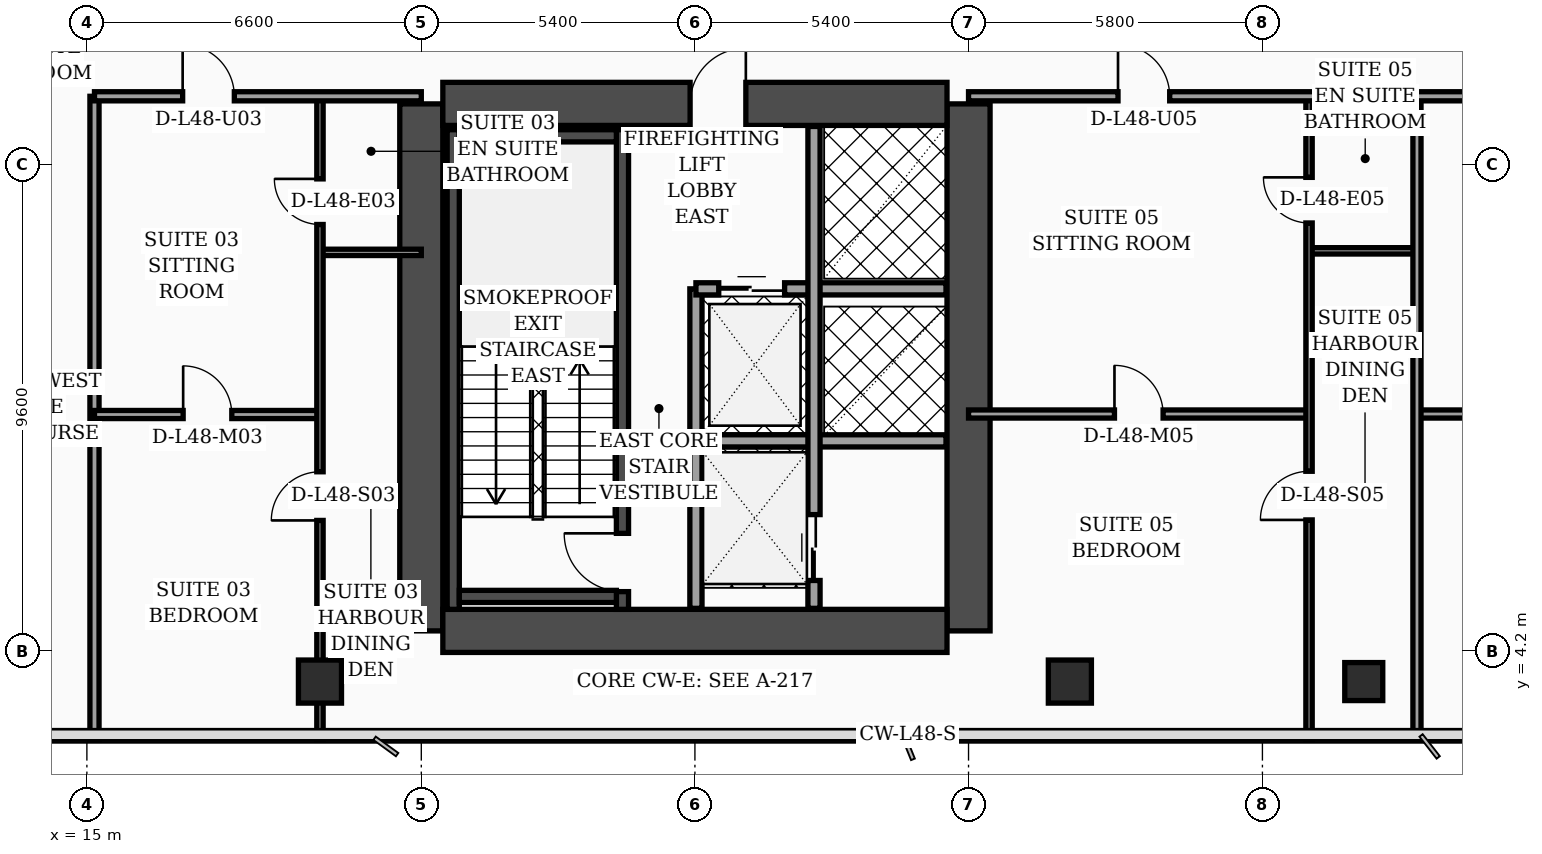
"""IFC4 building model, lengths in metres.
Left out: names, types, materials, properties, quantities, classifications, styles, units other than length and angle.
Written with IfcOpenShell. Run it as: python <this file> out.ifc"""

import sys

from ifc_helpers import new_model, si_unit, direction, frame, frame_2d, origin, origin_2d, place, context, subcontext, project, spatial, rectangle, hollow_rectangle, extrude, element, fill, save


model = new_model("IFC4")
c1 = context("Model", 3, precision=1e-05, world=origin(), true_north=direction((0.0, 1.0)))
c2 = subcontext(c1, "Body", "Model", "MODEL_VIEW")
j1 = project(units=[si_unit("LENGTHUNIT", "METRE"), si_unit("PLANEANGLEUNIT", "RADIAN")], contexts=[c1])
p1 = place(None, origin())
s1 = spatial("IfcSite", under=j1, at=p1, CompositionType="ELEMENT")
p2 = place(p1, origin())
s2 = spatial("IfcBuilding", under=s1, at=p2, CompositionType="ELEMENT")
p3 = place(p2, frame((0.0, 0.0, 195.1)))
s3 = spatial("IfcBuildingStorey", under=s2, at=p3, CompositionType="ELEMENT", Elevation=195.1)
for number, where, z_axis, x_axis in (
    (1, (21.6, 4.6, 0.0), (0.0, 0.0, 1.0), (0.0, 1.0, 0.0)),
    (2, (32.4, 4.6, 0.0), (0.0, 0.0, 1.0), (0.0, 1.0, 0.0)),
):
    element("IfcWall", number, at=place(p3, frame(where, z_axis=z_axis, x_axis=x_axis)), inside=s3, PredefinedType="SHEAR", context=c2, shape_type="SweptSolid", body=[
        extrude(rectangle(XDim=10.4, YDim=0.85, at=frame_2d((5.2, 0.0))), origin(), (0.0, 0.0, 1.0), 4.05),
    ])
p4 = place(p3, frame((22.025, 15.0, 0.0), z_axis=(0.0, 0.0, 1.0), x_axis=(1.0, 0.0, 0.0)))
e3 = element("IfcWall", 3, at=p4, inside=s3, PredefinedType="SHEAR", context=c2, shape_type="SweptSolid", body=[
    extrude(rectangle(XDim=9.95, YDim=0.85, at=frame_2d((4.975, 0.0))), origin(), (0.0, 0.0, 1.0), 4.05),
])
p5 = place(p4, frame((4.88, 0.0, 0.0)))
e4 = element("IfcOpeningElement", 4, at=p5, cuts=e3, PredefinedType="OPENING", context=c2, shape_type="SweptSolid", body=[
    extrude(rectangle(XDim=1.1, YDim=2.2, at=frame_2d((0.55, 1.1))), frame((0.0, 0.435, 0.0), z_axis=(0.0, -1.0, 0.0), x_axis=(1.0, 0.0, 0.0)), (0.0, 0.0, 1.0), 0.87),
])
p6 = place(p3, frame((22.025, 4.6, 0.0), z_axis=(0.0, 0.0, 1.0), x_axis=(1.0, 0.0, 0.0)))
e5 = element("IfcWall", 5, at=p6, inside=s3, PredefinedType="SHEAR", context=c2, shape_type="SweptSolid", body=[
    extrude(rectangle(XDim=9.95, YDim=0.85, at=frame_2d((4.975, 0.0))), origin(), (0.0, 0.0, 1.0), 4.05),
])
p7 = place(p3, frame((22.23, 5.025, 0.0), z_axis=(0.0, 0.0, 1.0), x_axis=(0.0, 1.0, 0.0)))
e6 = element("IfcWall", 6, at=p7, inside=s3, PredefinedType="SOLIDWALL", context=c2, shape_type="SweptSolid", body=[
    extrude(rectangle(XDim=9.465, YDim=0.24, at=frame_2d((4.732, 0.0))), origin(), (0.0, 0.0, 1.0), 4.05),
])
p8 = place(p3, frame((25.57, 5.025, 0.0), z_axis=(0.0, 0.0, 1.0), x_axis=(0.0, 1.0, 0.0)))
e7 = element("IfcWall", 7, at=p8, inside=s3, PredefinedType="SOLIDWALL", context=c2, shape_type="SweptSolid", body=[
    extrude(rectangle(XDim=9.465, YDim=0.24, at=frame_2d((4.732, 0.0))), origin(), (0.0, 0.0, 1.0), 4.05),
])
p9 = place(p8, frame((0.35, 0.0, 0.0)))
e8 = element("IfcOpeningElement", 8, at=p9, cuts=e7, PredefinedType="OPENING", context=c2, shape_type="SweptSolid", body=[
    extrude(rectangle(XDim=1.15, YDim=2.2, at=frame_2d((0.575, 1.1))), frame((0.0, 0.13, 0.0), z_axis=(0.0, -1.0, 0.0), x_axis=(1.0, 0.0, 0.0)), (0.0, 0.0, 1.0), 0.26),
])
for number, where, z_axis, x_axis in (
    (9, (22.35, 5.28, 0.0), (0.0, 0.0, 1.0), (1.0, 0.0, 0.0)),
    (10, (22.35, 14.37, 0.0), (0.0, 0.0, 1.0), (1.0, 0.0, 0.0)),
):
    element("IfcWall", number, at=place(p3, frame(where, z_axis=z_axis, x_axis=x_axis)), inside=s3, PredefinedType="SOLIDWALL", context=c2, shape_type="SweptSolid", body=[
        extrude(rectangle(XDim=3.1, YDim=0.24, at=frame_2d((1.55, 0.0))), origin(), (0.0, 0.0, 1.0), 4.05),
    ])
for number, where, z_axis, x_axis in (
    (11, (19.6, 3.6, 0.0), (0.0, 0.0, 1.0), (1.0, 0.0, 0.0)),
    (12, (34.4, 3.6, 0.0), (0.0, 0.0, 1.0), (1.0, 0.0, 0.0)),
):
    element("IfcColumn", number, at=place(p3, frame(where, z_axis=z_axis, x_axis=x_axis)), inside=s3, PredefinedType="COLUMN", context=c2, shape_type="SweptSolid", body=[
        extrude(hollow_rectangle(XDim=0.85, YDim=0.85, WallThickness=0.036, at=origin_2d()), origin(), (0.0, 0.0, 1.0), 4.05),
    ])
p10 = place(p3, frame((40.2, 3.6, 0.0), z_axis=(0.0, 0.0, 1.0), x_axis=(1.0, 0.0, 0.0)))
e13 = element("IfcColumn", 13, at=p10, inside=s3, PredefinedType="COLUMN", context=c2, shape_type="SweptSolid", body=[
    extrude(hollow_rectangle(XDim=0.75, YDim=0.75, WallThickness=0.032, at=origin_2d()), origin(), (0.0, 0.0, 1.0), 4.05),
])
p11 = place(p3, frame((27.02, 5.045, 0.0), z_axis=(0.0, 0.0, 1.0), x_axis=(0.0, 1.0, 0.0)))
e14 = element("IfcWall", 14, at=p11, inside=s3, PredefinedType="SOLIDWALL", context=c2, shape_type="SweptSolid", body=[
    extrude(rectangle(XDim=6.305, YDim=0.24, at=frame_2d((3.153, 0.0))), origin(), (0.0, 0.0, 1.0), 4.05),
])
p12 = place(p3, frame((27.02, 11.35, 0.0), z_axis=(0.0, 0.0, 1.0), x_axis=(1.0, 0.0, 0.0)))
e15 = element("IfcWall", 15, at=p12, inside=s3, PredefinedType="SOLIDWALL", context=c2, shape_type="SweptSolid", body=[
    extrude(rectangle(XDim=4.935, YDim=0.24, at=frame_2d((2.468, 0.0))), origin(), (0.0, 0.0, 1.0), 4.05),
])
p13 = place(p12, frame((0.45, 0.0, 0.0)))
e16 = element("IfcOpeningElement", 16, at=p13, cuts=e15, PredefinedType="OPENING", context=c2, shape_type="SweptSolid", body=[
    extrude(rectangle(XDim=1.3, YDim=2.35, at=frame_2d((0.65, 1.175))), frame((0.0, 0.13, 0.0), z_axis=(0.0, -1.0, 0.0), x_axis=(1.0, 0.0, 0.0)), (0.0, 0.0, 1.0), 0.26),
])
p14 = place(p3, frame((27.02, 8.35, 0.0), z_axis=(0.0, 0.0, 1.0), x_axis=(1.0, 0.0, 0.0)))
e17 = element("IfcWall", 17, at=p14, inside=s3, PredefinedType="SOLIDWALL", context=c2, shape_type="SweptSolid", body=[
    extrude(rectangle(XDim=4.935, YDim=0.24, at=frame_2d((2.468, 0.0))), origin(), (0.0, 0.0, 1.0), 4.05),
])
p15 = place(p3, frame((29.35, 5.045, 0.0), z_axis=(0.0, 0.0, 1.0), x_axis=(0.0, 1.0, 0.0)))
e18 = element("IfcWall", 18, at=p15, inside=s3, PredefinedType="SOLIDWALL", context=c2, shape_type="SweptSolid", body=[
    extrude(rectangle(XDim=9.51, YDim=0.24, at=frame_2d((4.755, 0.0))), origin(), (0.0, 0.0, 1.0), 4.05),
])
p16 = place(p15, frame((0.55, 0.0, 0.0)))
e19 = element("IfcOpeningElement", 19, at=p16, cuts=e18, PredefinedType="OPENING", context=c2, shape_type="SweptSolid", body=[
    extrude(rectangle(XDim=1.3, YDim=2.35, at=frame_2d((0.65, 1.175))), frame((0.0, 0.13, 0.0), z_axis=(0.0, -1.0, 0.0), x_axis=(1.0, 0.0, 0.0)), (0.0, 0.0, 1.0), 0.26),
])
p17 = place(p3, frame((15.15, 2.44, 0.0), z_axis=(0.0, 0.0, 1.0), x_axis=(0.0, 1.0, 0.0)))
e20 = element("IfcWall", 20, at=p17, inside=s3, PredefinedType="PARTITIONING", context=c2, shape_type="SweptSolid", body=[
    extrude(rectangle(XDim=12.71, YDim=0.18, at=frame_2d((6.355, 0.0))), origin(), (0.0, 0.0, 1.0), 2.35),
])
p18 = place(p3, frame((19.6, 12.07, 0.0), z_axis=(0.0, 0.0, 1.0), x_axis=(1.0, 0.0, 0.0)))
e21 = element("IfcWall", 21, at=p18, inside=s3, PredefinedType="PARTITIONING", context=c2, shape_type="SweptSolid", body=[
    extrude(rectangle(XDim=2.0, YDim=0.125, at=frame_2d((1.0, 0.0))), origin(), (0.0, 0.0, 1.0), 4.05),
])
p19 = place(p3, frame((15.15, 8.87, 0.0), z_axis=(0.0, 0.0, 1.0), x_axis=(1.0, 0.0, 0.0)))
e22 = element("IfcWall", 22, at=p19, inside=s3, PredefinedType="PARTITIONING", context=c2, shape_type="SweptSolid", body=[
    extrude(rectangle(XDim=4.45, YDim=0.16, at=frame_2d((2.225, 0.0))), origin(), (0.0, 0.0, 1.0), 4.05),
])
p20 = place(p19, frame((1.75, 0.0, 0.0)))
e23 = element("IfcOpeningElement", 23, at=p20, cuts=e22, PredefinedType="OPENING", context=c2, shape_type="SweptSolid", body=[
    extrude(rectangle(XDim=0.96, YDim=2.2, at=frame_2d((0.48, 1.1))), frame((0.0, 0.09, 0.0), z_axis=(0.0, -1.0, 0.0), x_axis=(1.0, 0.0, 0.0)), (0.0, 0.0, 1.0), 0.18),
])
p21 = place(p3, frame((19.6, 2.44, 0.0), z_axis=(0.0, 0.0, 1.0), x_axis=(0.0, 1.0, 0.0)))
e24 = element("IfcWall", 24, at=p21, inside=s3, PredefinedType="PARTITIONING", context=c2, shape_type="SweptSolid", body=[
    extrude(rectangle(XDim=12.71, YDim=0.125, at=frame_2d((6.355, 0.0))), origin(), (0.0, 0.0, 1.0), 2.35),
])
p22 = place(p21, frame((4.34, 0.0, 0.0)))
e25 = element("IfcOpeningElement", 25, at=p22, cuts=e24, PredefinedType="OPENING", context=c2, shape_type="SweptSolid", body=[
    extrude(rectangle(XDim=0.96, YDim=2.2, at=frame_2d((0.48, 1.1))), frame((0.0, 0.073, 0.0), z_axis=(0.0, -1.0, 0.0), x_axis=(1.0, 0.0, 0.0)), (0.0, 0.0, 1.0), 0.145),
])
p23 = place(p21, frame((10.18, 0.0, 0.0)))
e26 = element("IfcOpeningElement", 26, at=p23, cuts=e24, PredefinedType="OPENING", context=c2, shape_type="SweptSolid", body=[
    extrude(rectangle(XDim=0.9, YDim=2.15, at=frame_2d((0.45, 1.075))), frame((0.0, 0.073, 0.0), z_axis=(0.0, -1.0, 0.0), x_axis=(1.0, 0.0, 0.0)), (0.0, 0.0, 1.0), 0.145),
])
p24 = place(p3, frame((15.15, 15.15, 0.0), z_axis=(0.0, 0.0, 1.0), x_axis=(1.0, 0.0, 0.0)))
e27 = element("IfcWall", 27, at=p24, inside=s3, PredefinedType="PARTITIONING", context=c2, shape_type="SweptSolid", body=[
    extrude(rectangle(XDim=6.45, YDim=0.18, at=frame_2d((3.225, 0.0))), origin(), (0.0, 0.0, 1.0), 2.35),
])
p25 = place(p24, frame((1.74, 0.0, 0.0)))
e28 = element("IfcOpeningElement", 28, at=p25, cuts=e27, PredefinedType="OPENING", context=c2, shape_type="SweptSolid", body=[
    extrude(rectangle(XDim=1.02, YDim=2.2, at=frame_2d((0.51, 1.1))), frame((0.0, 0.1, 0.0), z_axis=(0.0, -1.0, 0.0), x_axis=(1.0, 0.0, 0.0)), (0.0, 0.0, 1.0), 0.2),
])
p26 = place(p3, frame((39.12, 12.1, 0.0), z_axis=(0.0, 0.0, 1.0), x_axis=(1.0, 0.0, 0.0)))
e29 = element("IfcWall", 29, at=p26, inside=s3, PredefinedType="PARTITIONING", context=c2, shape_type="SweptSolid", body=[
    extrude(rectangle(XDim=2.13, YDim=0.125, at=frame_2d((1.065, 0.0))), origin(), (0.0, 0.0, 1.0), 4.05),
])
p27 = place(p3, frame((32.4, 8.88, 0.0), z_axis=(0.0, 0.0, 1.0), x_axis=(1.0, 0.0, 0.0)))
e30 = element("IfcWall", 30, at=p27, inside=s3, PredefinedType="PARTITIONING", context=c2, shape_type="SweptSolid", body=[
    extrude(rectangle(XDim=6.72, YDim=0.16, at=frame_2d((3.36, 0.0))), origin(), (0.0, 0.0, 1.0), 3.45),
])
p28 = place(p27, frame((2.88, 0.0, 0.0)))
e31 = element("IfcOpeningElement", 31, at=p28, cuts=e30, PredefinedType="OPENING", context=c2, shape_type="SweptSolid", body=[
    extrude(rectangle(XDim=0.96, YDim=2.2, at=frame_2d((0.48, 1.1))), frame((0.0, 0.09, 0.0), z_axis=(0.0, -1.0, 0.0), x_axis=(1.0, 0.0, 0.0)), (0.0, 0.0, 1.0), 0.18),
])
p29 = place(p3, frame((39.12, 2.44, 0.0), z_axis=(0.0, 0.0, 1.0), x_axis=(0.0, 1.0, 0.0)))
e32 = element("IfcWall", 32, at=p29, inside=s3, PredefinedType="PARTITIONING", context=c2, shape_type="SweptSolid", body=[
    extrude(rectangle(XDim=12.71, YDim=0.125, at=frame_2d((6.355, 0.0))), origin(), (0.0, 0.0, 1.0), 2.35),
])
p30 = place(p29, frame((4.35, 0.0, 0.0)))
e33 = element("IfcOpeningElement", 33, at=p30, cuts=e32, PredefinedType="OPENING", context=c2, shape_type="SweptSolid", body=[
    extrude(rectangle(XDim=0.96, YDim=2.2, at=frame_2d((0.48, 1.1))), frame((0.0, 0.073, 0.0), z_axis=(0.0, -1.0, 0.0), x_axis=(1.0, 0.0, 0.0)), (0.0, 0.0, 1.0), 0.145),
])
p31 = place(p29, frame((10.21, 0.0, 0.0)))
e34 = element("IfcOpeningElement", 34, at=p31, cuts=e32, PredefinedType="OPENING", context=c2, shape_type="SweptSolid", body=[
    extrude(rectangle(XDim=0.9, YDim=2.15, at=frame_2d((0.45, 1.075))), frame((0.0, 0.073, 0.0), z_axis=(0.0, -1.0, 0.0), x_axis=(1.0, 0.0, 0.0)), (0.0, 0.0, 1.0), 0.145),
])
p32 = place(p3, frame((41.25, 8.88, 0.0), z_axis=(0.0, 0.0, 1.0), x_axis=(1.0, 0.0, 0.0)))
e35 = element("IfcWall", 35, at=p32, inside=s3, PredefinedType="PARTITIONING", context=c2, shape_type="SweptSolid", body=[
    extrude(rectangle(XDim=5.11, YDim=0.16, at=frame_2d((2.555, 0.0))), origin(), (0.0, 0.0, 1.0), 4.05),
])
p33 = place(p32, frame((2.07, 0.0, 0.0)))
e36 = element("IfcOpeningElement", 36, at=p33, cuts=e35, PredefinedType="OPENING", context=c2, shape_type="SweptSolid", body=[
    extrude(rectangle(XDim=0.96, YDim=2.2, at=frame_2d((0.48, 1.1))), frame((0.0, 0.09, 0.0), z_axis=(0.0, -1.0, 0.0), x_axis=(1.0, 0.0, 0.0)), (0.0, 0.0, 1.0), 0.18),
])
p34 = place(p3, frame((41.25, 2.44, 0.0), z_axis=(0.0, 0.0, 1.0), x_axis=(0.0, 1.0, 0.0)))
e37 = element("IfcWall", 37, at=p34, inside=s3, PredefinedType="PARTITIONING", context=c2, shape_type="SweptSolid", body=[
    extrude(rectangle(XDim=12.71, YDim=0.16, at=frame_2d((6.355, 0.0))), origin(), (0.0, 0.0, 1.0), 2.35),
])
p35 = place(p3, frame((32.4, 15.15, 0.0), z_axis=(0.0, 0.0, 1.0), x_axis=(1.0, 0.0, 0.0)))
e38 = element("IfcWall", 38, at=p35, inside=s3, PredefinedType="PARTITIONING", context=c2, shape_type="SweptSolid", body=[
    extrude(rectangle(XDim=16.0, YDim=0.18, at=frame_2d((8.0, 0.0))), origin(), (0.0, 0.0, 1.0), 2.35),
])
p36 = place(p35, frame((2.95, 0.0, 0.0)))
e39 = element("IfcOpeningElement", 39, at=p36, cuts=e38, PredefinedType="OPENING", context=c2, shape_type="SweptSolid", body=[
    extrude(rectangle(XDim=1.02, YDim=2.2, at=frame_2d((0.51, 1.1))), frame((0.0, 0.1, 0.0), z_axis=(0.0, -1.0, 0.0), x_axis=(1.0, 0.0, 0.0)), (0.0, 0.0, 1.0), 0.2),
])
p37 = place(p35, frame((10.9, 0.0, 0.0)))
e40 = element("IfcOpeningElement", 40, at=p37, cuts=e38, PredefinedType="OPENING", context=c2, shape_type="SweptSolid", body=[
    extrude(rectangle(XDim=1.02, YDim=2.2, at=frame_2d((0.51, 1.1))), frame((0.0, 0.1, 0.0), z_axis=(0.0, -1.0, 0.0), x_axis=(1.0, 0.0, 0.0)), (0.0, 0.0, 1.0), 0.2),
])
p38 = place(p13, origin())
e41 = element("IfcDoor", 41, at=p38, inside=s3, OperationType="DOUBLE_DOOR_SLIDING", PredefinedType="DOOR", context=c2, shape_type="SweptSolid", body=[
    extrude(rectangle(XDim=1.3, YDim=2.35, at=frame_2d((0.65, 1.175))), frame((0.0, 0.025, 0.0), z_axis=(0.0, -1.0, 0.0), x_axis=(1.0, 0.0, 0.0)), (0.0, 0.0, 1.0), 0.05),
])
fill(e16, e41)
p39 = place(p16, origin())
e42 = element("IfcDoor", 42, at=p39, inside=s3, OperationType="DOUBLE_DOOR_SLIDING", PredefinedType="DOOR", context=c2, shape_type="SweptSolid", body=[
    extrude(rectangle(XDim=1.3, YDim=2.35, at=frame_2d((0.65, 1.175))), frame((0.0, 0.025, 0.0), z_axis=(0.0, -1.0, 0.0), x_axis=(1.0, 0.0, 0.0)), (0.0, 0.0, 1.0), 0.05),
])
fill(e19, e42)
p40 = place(p20, origin())
e43 = element("IfcDoor", 43, at=p40, inside=s3, OperationType="SINGLE_SWING_LEFT", PredefinedType="DOOR", context=c2, shape_type="SweptSolid", body=[
    extrude(rectangle(XDim=0.96, YDim=2.2, at=frame_2d((0.48, 1.1))), frame((0.0, 0.025, 0.0), z_axis=(0.0, -1.0, 0.0), x_axis=(1.0, 0.0, 0.0)), (0.0, 0.0, 1.0), 0.05),
])
fill(e23, e43)
p41 = place(p22, origin())
e44 = element("IfcDoor", 44, at=p41, inside=s3, OperationType="SINGLE_SWING_LEFT", PredefinedType="DOOR", context=c2, shape_type="SweptSolid", body=[
    extrude(rectangle(XDim=0.96, YDim=2.2, at=frame_2d((0.48, 1.1))), frame((0.0, 0.025, 0.0), z_axis=(0.0, -1.0, 0.0), x_axis=(1.0, 0.0, 0.0)), (0.0, 0.0, 1.0), 0.05),
])
fill(e25, e44)
p42 = place(p23, origin())
e45 = element("IfcDoor", 45, at=p42, inside=s3, OperationType="SINGLE_SWING_RIGHT", PredefinedType="DOOR", context=c2, shape_type="SweptSolid", body=[
    extrude(rectangle(XDim=0.9, YDim=2.15, at=frame_2d((0.45, 1.075))), frame((0.0, 0.025, 0.0), z_axis=(0.0, -1.0, 0.0), x_axis=(1.0, 0.0, 0.0)), (0.0, 0.0, 1.0), 0.05),
])
fill(e26, e45)
p43 = place(p25, origin())
e46 = element("IfcDoor", 46, at=p43, inside=s3, OperationType="SINGLE_SWING_LEFT", PredefinedType="DOOR", context=c2, shape_type="SweptSolid", body=[
    extrude(rectangle(XDim=1.02, YDim=2.2, at=frame_2d((0.51, 1.1))), frame((0.0, 0.025, 0.0), z_axis=(0.0, -1.0, 0.0), x_axis=(1.0, 0.0, 0.0)), (0.0, 0.0, 1.0), 0.05),
])
fill(e28, e46)
p44 = place(p28, origin())
e47 = element("IfcDoor", 47, at=p44, inside=s3, OperationType="SINGLE_SWING_LEFT", PredefinedType="DOOR", context=c2, shape_type="SweptSolid", body=[
    extrude(rectangle(XDim=0.96, YDim=2.2, at=frame_2d((0.48, 1.1))), frame((0.0, 0.025, 0.0), z_axis=(0.0, -1.0, 0.0), x_axis=(1.0, 0.0, 0.0)), (0.0, 0.0, 1.0), 0.05),
])
fill(e31, e47)
p45 = place(p30, origin())
e48 = element("IfcDoor", 48, at=p45, inside=s3, OperationType="SINGLE_SWING_LEFT", PredefinedType="DOOR", context=c2, shape_type="SweptSolid", body=[
    extrude(rectangle(XDim=0.96, YDim=2.2, at=frame_2d((0.48, 1.1))), frame((0.0, 0.025, 0.0), z_axis=(0.0, -1.0, 0.0), x_axis=(1.0, 0.0, 0.0)), (0.0, 0.0, 1.0), 0.05),
])
fill(e33, e48)
p46 = place(p31, origin())
e49 = element("IfcDoor", 49, at=p46, inside=s3, OperationType="SINGLE_SWING_RIGHT", PredefinedType="DOOR", context=c2, shape_type="SweptSolid", body=[
    extrude(rectangle(XDim=0.9, YDim=2.15, at=frame_2d((0.45, 1.075))), frame((0.0, 0.025, 0.0), z_axis=(0.0, -1.0, 0.0), x_axis=(1.0, 0.0, 0.0)), (0.0, 0.0, 1.0), 0.05),
])
fill(e34, e49)
p47 = place(p36, origin())
e50 = element("IfcDoor", 50, at=p47, inside=s3, OperationType="SINGLE_SWING_LEFT", PredefinedType="DOOR", context=c2, shape_type="SweptSolid", body=[
    extrude(rectangle(XDim=1.02, YDim=2.2, at=frame_2d((0.51, 1.1))), frame((0.0, 0.025, 0.0), z_axis=(0.0, -1.0, 0.0), x_axis=(1.0, 0.0, 0.0)), (0.0, 0.0, 1.0), 0.05),
])
fill(e39, e50)
p48 = place(p9, origin())
e51 = element("IfcDoor", 51, at=p48, inside=s3, OperationType="SINGLE_SWING_RIGHT", PredefinedType="DOOR", context=c2, shape_type="SweptSolid", body=[
    extrude(rectangle(XDim=1.15, YDim=2.2, at=frame_2d((0.575, 1.1))), frame((0.0, 0.025, 0.0), z_axis=(0.0, -1.0, 0.0), x_axis=(1.0, 0.0, 0.0)), (0.0, 0.0, 1.0), 0.05),
])
fill(e8, e51)
p49 = place(p5, origin())
e52 = element("IfcDoor", 52, at=p49, inside=s3, OperationType="SINGLE_SWING_RIGHT", PredefinedType="DOOR", context=c2, shape_type="SweptSolid", body=[
    extrude(rectangle(XDim=1.1, YDim=2.2, at=frame_2d((0.55, 1.1))), frame((0.0, 0.025, 0.0), z_axis=(0.0, -1.0, 0.0), x_axis=(1.0, 0.0, 0.0)), (0.0, 0.0, 1.0), 0.05),
])
fill(e4, e52)
save(model, sys.argv[1])
